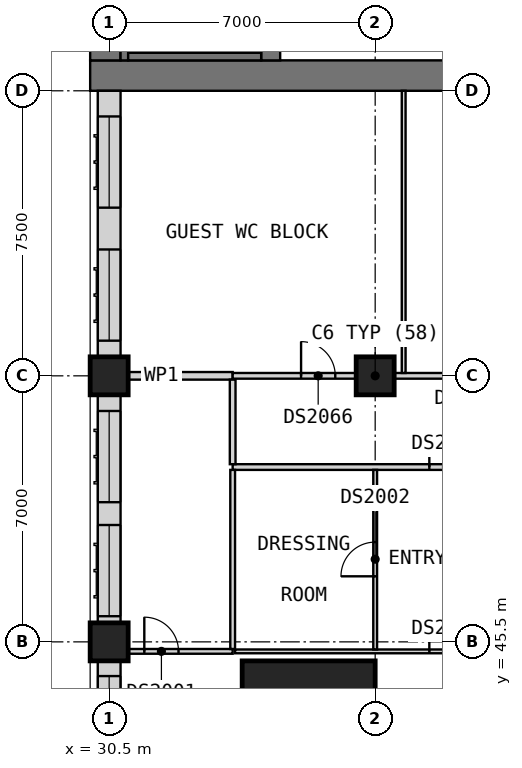
"""IFC4 building model, lengths in metres.
Left out: names, types, materials, properties, quantities, classifications, styles, units other than length and angle.
Written with IfcOpenShell. Run it as: python <this file> out.ifc"""

import sys

from ifc_helpers import new_model, si_unit, direction, frame, frame_2d, origin, origin_2d, place, context, subcontext, project, spatial, rectangle, extrude, element, fill, save


model = new_model("IFC4")
c1 = context("Model", 3, precision=1e-05, world=origin(), true_north=direction((0.0, 1.0)))
c2 = subcontext(c1, "Body", "Model", "MODEL_VIEW")
j1 = project(units=[si_unit("LENGTHUNIT", "METRE"), si_unit("PLANEANGLEUNIT", "RADIAN")], contexts=[c1])
p1 = place(None, origin())
s1 = spatial("IfcSite", under=j1, at=p1, CompositionType="ELEMENT")
p2 = place(p1, origin())
s2 = spatial("IfcBuilding", under=s1, at=p2, CompositionType="ELEMENT")
p3 = place(p2, frame((0.0, 0.0, 162.6)))
s3 = spatial("IfcBuildingStorey", under=s2, at=p3, CompositionType="ELEMENT", Elevation=162.6)
for number, where, z_axis, x_axis in (
    (1, (30.5, 45.5, 0.0), (0.0, 0.0, 1.0), (1.0, 0.0, 0.0)),
    (2, (30.5, 52.5, 0.0), (0.0, 0.0, 1.0), (1.0, 0.0, 0.0)),
    (3, (37.5, 52.5, 0.0), (0.0, 0.0, 1.0), (1.0, 0.0, 0.0)),
):
    element("IfcColumn", number, at=place(p3, frame(where, z_axis=z_axis, x_axis=x_axis)), inside=s3, PredefinedType="COLUMN", context=c2, shape_type="SweptSolid", body=[
        extrude(rectangle(XDim=1.0, YDim=1.0, at=origin_2d()), origin(), (0.0, 0.0, 1.0), 3.6),
    ])
p4 = place(p3, frame((35.75, 43.25, 0.0), z_axis=(0.0, 0.0, 1.0), x_axis=(1.0, 0.0, 0.0)))
e4 = element("IfcColumn", 4, at=p4, inside=s3, PredefinedType="COLUMN", context=c2, shape_type="SweptSolid", body=[
    extrude(rectangle(XDim=3.5, YDim=3.5, at=origin_2d()), origin(), (0.0, 0.0, 1.0), 3.6),
])
p5 = place(p3, frame((30.0, 60.4, 0.0), z_axis=(0.0, 0.0, 1.0), x_axis=(1.0, 0.0, 0.0)))
e5 = element("IfcWall", 5, at=p5, inside=s3, PredefinedType="SHEAR", context=c2, shape_type="SweptSolid", body=[
    extrude(rectangle(XDim=30.0, YDim=0.8, at=frame_2d((15.0, 0.0))), origin(), (0.0, 0.0, 1.0), 3.6),
])
p6 = place(p5, frame((21.9, 0.0, 0.0)))
e6 = element("IfcOpeningElement", 6, at=p6, cuts=e5, PredefinedType="OPENING", context=c2, shape_type="SweptSolid", body=[
    extrude(rectangle(XDim=1.8, YDim=2.1, at=frame_2d((0.9, 1.05))), frame((0.0, 0.41, 0.0), z_axis=(0.0, -1.0, 0.0), x_axis=(1.0, 0.0, 0.0)), (0.0, 0.0, 1.0), 0.82),
])
p7 = place(p5, frame((26.5, 0.0, 0.0)))
e7 = element("IfcOpeningElement", 7, at=p7, cuts=e5, PredefinedType="OPENING", context=c2, shape_type="SweptSolid", body=[
    extrude(rectangle(XDim=1.2, YDim=2.1, at=frame_2d((0.6, 1.05))), frame((0.0, 0.41, 0.0), z_axis=(0.0, -1.0, 0.0), x_axis=(1.0, 0.0, 0.0)), (0.0, 0.0, 1.0), 0.82),
])
p8 = place(p3, frame((30.4, 60.8, 0.0), z_axis=(0.0, 0.0, 1.0), x_axis=(0.0, 1.0, 0.0)))
e8 = element("IfcWall", 8, at=p8, inside=s3, PredefinedType="SHEAR", context=c2, shape_type="SweptSolid", body=[
    extrude(rectangle(XDim=20.9, YDim=0.8, at=frame_2d((10.45, 0.0))), origin(), (0.0, 0.0, 1.0), 3.6),
])
p9 = place(p3, frame((34.75, 60.8, 0.0), z_axis=(0.0, 0.0, 1.0), x_axis=(0.0, 1.0, 0.0)))
e9 = element("IfcWall", 9, at=p9, inside=s3, PredefinedType="SHEAR", context=c2, shape_type="SweptSolid", body=[
    extrude(rectangle(XDim=3.4, YDim=0.5, at=frame_2d((1.7, 0.0))), origin(), (0.0, 0.0, 1.0), 3.6),
])
p10 = place(p3, frame((30.5, 60.0, 0.0), z_axis=(0.0, 0.0, 1.0), x_axis=(0.0, -1.0, 0.0)))
e10 = element("IfcWall", 10, at=p10, inside=s3, PredefinedType="SOLIDWALL", context=c2, shape_type="SweptSolid", body=[
    extrude(rectangle(XDim=7.0, YDim=0.6, at=frame_2d((3.5, 0.0))), origin(), (0.0, 0.0, 1.0), 3.2),
])
p11 = place(p10, frame((4.175, 0.0, 0.8)))
e11 = element("IfcOpeningElement", 11, at=p11, cuts=e10, PredefinedType="OPENING", context=c2, shape_type="SweptSolid", body=[
    extrude(rectangle(XDim=2.4, YDim=1.8, at=frame_2d((1.2, 0.9))), frame((0.0, 0.31, 0.0), z_axis=(0.0, -1.0, 0.0), x_axis=(1.0, 0.0, 0.0)), (0.0, 0.0, 1.0), 0.62),
])
p12 = place(p10, frame((0.675, 0.0, 0.8)))
e12 = element("IfcOpeningElement", 12, at=p12, cuts=e10, PredefinedType="OPENING", context=c2, shape_type="SweptSolid", body=[
    extrude(rectangle(XDim=2.4, YDim=1.8, at=frame_2d((1.2, 0.9))), frame((0.0, 0.31, 0.0), z_axis=(0.0, -1.0, 0.0), x_axis=(1.0, 0.0, 0.0)), (0.0, 0.0, 1.0), 0.62),
])
p13 = place(p3, frame((30.5, 52.0, 0.0), z_axis=(0.0, 0.0, 1.0), x_axis=(0.0, -1.0, 0.0)))
e13 = element("IfcWall", 13, at=p13, inside=s3, PredefinedType="SOLIDWALL", context=c2, shape_type="SweptSolid", body=[
    extrude(rectangle(XDim=6.0, YDim=0.6, at=frame_2d((3.0, 0.0))), origin(), (0.0, 0.0, 1.0), 2.85),
])
p14 = place(p13, frame((3.425, 0.0, 0.8)))
e14 = element("IfcOpeningElement", 14, at=p14, cuts=e13, PredefinedType="OPENING", context=c2, shape_type="SweptSolid", body=[
    extrude(rectangle(XDim=2.4, YDim=1.8, at=frame_2d((1.2, 0.9))), frame((0.0, 0.31, 0.0), z_axis=(0.0, -1.0, 0.0), x_axis=(1.0, 0.0, 0.0)), (0.0, 0.0, 1.0), 0.62),
])
p15 = place(p13, frame((0.425, 0.0, 0.8)))
e15 = element("IfcOpeningElement", 15, at=p15, cuts=e13, PredefinedType="OPENING", context=c2, shape_type="SweptSolid", body=[
    extrude(rectangle(XDim=2.4, YDim=1.8, at=frame_2d((1.2, 0.9))), frame((0.0, 0.31, 0.0), z_axis=(0.0, -1.0, 0.0), x_axis=(1.0, 0.0, 0.0)), (0.0, 0.0, 1.0), 0.62),
])
p16 = place(p3, frame((30.5, 45.0, 0.0), z_axis=(0.0, 0.0, 1.0), x_axis=(0.0, -1.0, 0.0)))
e16 = element("IfcWall", 16, at=p16, inside=s3, PredefinedType="SOLIDWALL", context=c2, shape_type="SweptSolid", body=[
    extrude(rectangle(XDim=3.5, YDim=0.6, at=frame_2d((1.75, 0.0))), origin(), (0.0, 0.0, 1.0), 3.2),
])
p17 = place(p16, frame((0.4, 0.0, 0.8)))
e17 = element("IfcOpeningElement", 17, at=p17, cuts=e16, PredefinedType="OPENING", context=c2, shape_type="SweptSolid", body=[
    extrude(rectangle(XDim=1.8, YDim=1.8, at=frame_2d((0.9, 0.9))), frame((0.0, 0.31, 0.0), z_axis=(0.0, -1.0, 0.0), x_axis=(1.0, 0.0, 0.0)), (0.0, 0.0, 1.0), 0.62),
])
p18 = place(p3, frame((30.9, 60.8, 0.0), z_axis=(0.0, 0.0, 1.0), x_axis=(0.0, 1.0, 0.0)))
e18 = element("IfcWall", 18, at=p18, inside=s3, PredefinedType="SOLIDWALL", context=c2, shape_type="SweptSolid", body=[
    extrude(rectangle(XDim=20.9, YDim=0.2, at=frame_2d((10.45, 0.0))), origin(), (0.0, 0.0, 1.0), 3.19),
])
p19 = place(p3, frame((31.0, 60.9, 0.0), z_axis=(0.0, 0.0, 1.0), x_axis=(1.0, 0.0, 0.0)))
e19 = element("IfcWall", 19, at=p19, inside=s3, PredefinedType="SOLIDWALL", context=c2, shape_type="SweptSolid", body=[
    extrude(rectangle(XDim=3.5, YDim=0.2, at=frame_2d((1.75, 0.0))), origin(), (0.0, 0.0, 1.0), 3.19),
])
p20 = place(p3, frame((30.0, 52.5, 0.0), z_axis=(0.0, 0.0, 1.0), x_axis=(1.0, 0.0, 0.0)))
e20 = element("IfcWall", 20, at=p20, inside=s3, PredefinedType="PARTITIONING", context=c2, shape_type="SweptSolid", body=[
    extrude(rectangle(XDim=3.75, YDim=0.2, at=frame_2d((1.875, 0.0))), origin(), (0.0, 0.0, 1.0), 3.2),
])
p21 = place(p3, frame((33.75, 50.1, 0.0), z_axis=(0.0, 0.0, 1.0), x_axis=(1.0, 0.0, 0.0)))
e21 = element("IfcWall", 21, at=p21, inside=s3, PredefinedType="PARTITIONING", context=c2, shape_type="SweptSolid", body=[
    extrude(rectangle(XDim=39.9, YDim=0.15, at=frame_2d((19.95, 0.0))), origin(), (0.0, 0.0, 1.0), 3.2),
])
p22 = place(p21, frame((5.175, 0.0, 0.0)))
e22 = element("IfcOpeningElement", 22, at=p22, cuts=e21, PredefinedType="OPENING", context=c2, shape_type="SweptSolid", body=[
    extrude(rectangle(XDim=0.9, YDim=2.1, at=frame_2d((0.45, 1.05))), frame((0.0, 0.085, 0.0), z_axis=(0.0, -1.0, 0.0), x_axis=(1.0, 0.0, 0.0)), (0.0, 0.0, 1.0), 0.17),
])
p23 = place(p21, frame((13.05, 0.0, 0.0)))
e23 = element("IfcOpeningElement", 23, at=p23, cuts=e21, PredefinedType="OPENING", context=c2, shape_type="SweptSolid", body=[
    extrude(rectangle(XDim=0.9, YDim=2.1, at=frame_2d((0.45, 1.05))), frame((0.0, 0.085, 0.0), z_axis=(0.0, -1.0, 0.0), x_axis=(1.0, 0.0, 0.0)), (0.0, 0.0, 1.0), 0.17),
])
p24 = place(p21, frame((20.55, 0.0, 0.0)))
e24 = element("IfcOpeningElement", 24, at=p24, cuts=e21, PredefinedType="OPENING", context=c2, shape_type="SweptSolid", body=[
    extrude(rectangle(XDim=0.9, YDim=2.1, at=frame_2d((0.45, 1.05))), frame((0.0, 0.085, 0.0), z_axis=(0.0, -1.0, 0.0), x_axis=(1.0, 0.0, 0.0)), (0.0, 0.0, 1.0), 0.17),
])
p25 = place(p21, frame((24.3, 0.0, 0.0)))
e25 = element("IfcOpeningElement", 25, at=p25, cuts=e21, PredefinedType="OPENING", context=c2, shape_type="SweptSolid", body=[
    extrude(rectangle(XDim=0.9, YDim=2.1, at=frame_2d((0.45, 1.05))), frame((0.0, 0.085, 0.0), z_axis=(0.0, -1.0, 0.0), x_axis=(1.0, 0.0, 0.0)), (0.0, 0.0, 1.0), 0.17),
])
p26 = place(p21, frame((36.113, 0.0, 0.0)))
e26 = element("IfcOpeningElement", 26, at=p26, cuts=e21, PredefinedType="OPENING", context=c2, shape_type="SweptSolid", body=[
    extrude(rectangle(XDim=0.9, YDim=2.1, at=frame_2d((0.45, 1.05))), frame((0.0, 0.085, 0.0), z_axis=(0.0, -1.0, 0.0), x_axis=(1.0, 0.0, 0.0)), (0.0, 0.0, 1.0), 0.17),
])
p27 = place(p21, frame((38.25, 0.0, 0.0)))
e27 = element("IfcOpeningElement", 27, at=p27, cuts=e21, PredefinedType="OPENING", context=c2, shape_type="SweptSolid", body=[
    extrude(rectangle(XDim=0.9, YDim=2.1, at=frame_2d((0.45, 1.05))), frame((0.0, 0.085, 0.0), z_axis=(0.0, -1.0, 0.0), x_axis=(1.0, 0.0, 0.0)), (0.0, 0.0, 1.0), 0.17),
])
p28 = place(p3, frame((33.75, 52.5, 0.0), z_axis=(0.0, 0.0, 1.0), x_axis=(1.0, 0.0, 0.0)))
e28 = element("IfcWall", 28, at=p28, inside=s3, PredefinedType="PARTITIONING", context=c2, shape_type="SweptSolid", body=[
    extrude(rectangle(XDim=17.15, YDim=0.15, at=frame_2d((8.575, 0.0))), origin(), (0.0, 0.0, 1.0), 3.2),
])
p29 = place(p28, frame((1.8, 0.0, 0.0)))
e29 = element("IfcOpeningElement", 29, at=p29, cuts=e28, PredefinedType="OPENING", context=c2, shape_type="SweptSolid", body=[
    extrude(rectangle(XDim=0.9, YDim=2.1, at=frame_2d((0.45, 1.05))), frame((0.0, 0.085, 0.0), z_axis=(0.0, -1.0, 0.0), x_axis=(1.0, 0.0, 0.0)), (0.0, 0.0, 1.0), 0.17),
])
p30 = place(p28, frame((5.775, 0.0, 0.0)))
e30 = element("IfcOpeningElement", 30, at=p30, cuts=e28, PredefinedType="OPENING", context=c2, shape_type="SweptSolid", body=[
    extrude(rectangle(XDim=0.9, YDim=2.1, at=frame_2d((0.45, 1.05))), frame((0.0, 0.085, 0.0), z_axis=(0.0, -1.0, 0.0), x_axis=(1.0, 0.0, 0.0)), (0.0, 0.0, 1.0), 0.17),
])
p31 = place(p28, frame((12.1, 0.0, 0.0)))
e31 = element("IfcOpeningElement", 31, at=p31, cuts=e28, PredefinedType="OPENING", context=c2, shape_type="SweptSolid", body=[
    extrude(rectangle(XDim=0.9, YDim=2.1, at=frame_2d((0.45, 1.05))), frame((0.0, 0.085, 0.0), z_axis=(0.0, -1.0, 0.0), x_axis=(1.0, 0.0, 0.0)), (0.0, 0.0, 1.0), 0.17),
])
p32 = place(p3, frame((33.75, 50.175, 0.0), z_axis=(0.0, 0.0, 1.0), x_axis=(0.0, 1.0, 0.0)))
e32 = element("IfcWall", 32, at=p32, inside=s3, PredefinedType="PARTITIONING", context=c2, shape_type="SweptSolid", body=[
    extrude(rectangle(XDim=2.225, YDim=0.15, at=frame_2d((1.112, 0.0))), origin(), (0.0, 0.0, 1.0), 3.2),
])
p33 = place(p3, frame((33.812, 45.25, 0.0), z_axis=(0.0, 0.0, 1.0), x_axis=(1.0, 0.0, 0.0)))
e33 = element("IfcWall", 33, at=p33, inside=s3, PredefinedType="PARTITIONING", context=c2, shape_type="SweptSolid", body=[
    extrude(rectangle(XDim=7.337, YDim=0.1, at=frame_2d((3.669, 0.0))), origin(), (0.0, 0.0, 1.0), 3.2),
])
p34 = place(p33, frame((5.113, 0.0, 0.0)))
e34 = element("IfcOpeningElement", 34, at=p34, cuts=e33, PredefinedType="OPENING", context=c2, shape_type="SweptSolid", body=[
    extrude(rectangle(XDim=0.9, YDim=2.1, at=frame_2d((0.45, 1.05))), frame((0.0, 0.06, 0.0), z_axis=(0.0, -1.0, 0.0), x_axis=(1.0, 0.0, 0.0)), (0.0, 0.0, 1.0), 0.12),
])
p35 = place(p3, frame((37.5, 45.3, 0.0), z_axis=(0.0, 0.0, 1.0), x_axis=(0.0, 1.0, 0.0)))
e35 = element("IfcWall", 35, at=p35, inside=s3, PredefinedType="PARTITIONING", context=c2, shape_type="SweptSolid", body=[
    extrude(rectangle(XDim=4.725, YDim=0.1, at=frame_2d((2.362, 0.0))), origin(), (0.0, 0.0, 1.0), 3.2),
])
p36 = place(p35, frame((1.925, 0.0, 0.0)))
e36 = element("IfcOpeningElement", 36, at=p36, cuts=e35, PredefinedType="OPENING", context=c2, shape_type="SweptSolid", body=[
    extrude(rectangle(XDim=0.9, YDim=2.1, at=frame_2d((0.45, 1.05))), frame((0.0, 0.06, 0.0), z_axis=(0.0, -1.0, 0.0), x_axis=(1.0, 0.0, 0.0)), (0.0, 0.0, 1.0), 0.12),
])
p37 = place(p3, frame((38.25, 52.575, 0.0), z_axis=(0.0, 0.0, 1.0), x_axis=(0.0, 1.0, 0.0)))
e37 = element("IfcWall", 37, at=p37, inside=s3, PredefinedType="PARTITIONING", context=c2, shape_type="SweptSolid", body=[
    extrude(rectangle(XDim=7.425, YDim=0.1, at=frame_2d((3.712, 0.0))), origin(), (0.0, 0.0, 1.0), 3.2),
])
p38 = place(p3, frame((30.0, 45.25, 0.0), z_axis=(0.0, 0.0, 1.0), x_axis=(1.0, 0.0, 0.0)))
e38 = element("IfcWall", 38, at=p38, inside=s3, PredefinedType="PARTITIONING", context=c2, shape_type="SweptSolid", body=[
    extrude(rectangle(XDim=3.75, YDim=0.125, at=frame_2d((1.875, 0.0))), origin(), (0.0, 0.0, 1.0), 2.85),
])
p39 = place(p38, frame((1.425, 0.0, 0.0)))
e39 = element("IfcOpeningElement", 39, at=p39, cuts=e38, PredefinedType="OPENING", context=c2, shape_type="SweptSolid", body=[
    extrude(rectangle(XDim=0.9, YDim=2.1, at=frame_2d((0.45, 1.05))), frame((0.0, 0.073, 0.0), z_axis=(0.0, -1.0, 0.0), x_axis=(1.0, 0.0, 0.0)), (0.0, 0.0, 1.0), 0.145),
])
p40 = place(p3, frame((33.75, 45.312, 0.0), z_axis=(0.0, 0.0, 1.0), x_axis=(0.0, 1.0, 0.0)))
e40 = element("IfcWall", 40, at=p40, inside=s3, PredefinedType="PARTITIONING", context=c2, shape_type="SweptSolid", body=[
    extrude(rectangle(XDim=4.712, YDim=0.125, at=frame_2d((2.356, 0.0))), origin(), (0.0, 0.0, 1.0), 3.2),
])
p41 = place(p11, origin())
e41 = element("IfcWindow", 41, at=p41, inside=s3, PartitioningType="SINGLE_PANEL", PredefinedType="WINDOW", context=c2, shape_type="SweptSolid", body=[
    extrude(rectangle(XDim=2.4, YDim=1.8, at=frame_2d((1.2, 0.9))), frame((0.0, -0.07, 0.0), z_axis=(0.0, -1.0, 0.0), x_axis=(1.0, 0.0, 0.0)), (0.0, 0.0, 1.0), 0.06),
])
fill(e11, e41)
p42 = place(p12, origin())
e42 = element("IfcWindow", 42, at=p42, inside=s3, PartitioningType="SINGLE_PANEL", PredefinedType="WINDOW", context=c2, shape_type="SweptSolid", body=[
    extrude(rectangle(XDim=2.4, YDim=1.8, at=frame_2d((1.2, 0.9))), frame((0.0, -0.07, 0.0), z_axis=(0.0, -1.0, 0.0), x_axis=(1.0, 0.0, 0.0)), (0.0, 0.0, 1.0), 0.06),
])
fill(e12, e42)
p43 = place(p14, origin())
e43 = element("IfcWindow", 43, at=p43, inside=s3, PartitioningType="SINGLE_PANEL", PredefinedType="WINDOW", context=c2, shape_type="SweptSolid", body=[
    extrude(rectangle(XDim=2.4, YDim=1.8, at=frame_2d((1.2, 0.9))), frame((0.0, -0.07, 0.0), z_axis=(0.0, -1.0, 0.0), x_axis=(1.0, 0.0, 0.0)), (0.0, 0.0, 1.0), 0.06),
])
fill(e14, e43)
p44 = place(p15, origin())
e44 = element("IfcWindow", 44, at=p44, inside=s3, PartitioningType="SINGLE_PANEL", PredefinedType="WINDOW", context=c2, shape_type="SweptSolid", body=[
    extrude(rectangle(XDim=2.4, YDim=1.8, at=frame_2d((1.2, 0.9))), frame((0.0, -0.07, 0.0), z_axis=(0.0, -1.0, 0.0), x_axis=(1.0, 0.0, 0.0)), (0.0, 0.0, 1.0), 0.06),
])
fill(e15, e44)
p45 = place(p17, origin())
e45 = element("IfcWindow", 45, at=p45, inside=s3, PartitioningType="SINGLE_PANEL", PredefinedType="WINDOW", context=c2, shape_type="SweptSolid", body=[
    extrude(rectangle(XDim=1.8, YDim=1.8, at=frame_2d((0.9, 0.9))), frame((0.0, -0.07, 0.0), z_axis=(0.0, -1.0, 0.0), x_axis=(1.0, 0.0, 0.0)), (0.0, 0.0, 1.0), 0.06),
])
fill(e17, e45)
p46 = place(p39, origin())
e46 = element("IfcDoor", 46, at=p46, inside=s3, OperationType="SINGLE_SWING_LEFT", PredefinedType="DOOR", context=c2, shape_type="SweptSolid", body=[
    extrude(rectangle(XDim=0.9, YDim=2.1, at=frame_2d((0.45, 1.05))), frame((0.0, 0.025, 0.0), z_axis=(0.0, -1.0, 0.0), x_axis=(1.0, 0.0, 0.0)), (0.0, 0.0, 1.0), 0.05),
])
fill(e39, e46)
p47 = place(p36, origin())
e47 = element("IfcDoor", 47, at=p47, inside=s3, OperationType="SINGLE_SWING_RIGHT", PredefinedType="DOOR", context=c2, shape_type="SweptSolid", body=[
    extrude(rectangle(XDim=0.9, YDim=2.1, at=frame_2d((0.45, 1.05))), frame((0.0, 0.025, 0.0), z_axis=(0.0, -1.0, 0.0), x_axis=(1.0, 0.0, 0.0)), (0.0, 0.0, 1.0), 0.05),
])
fill(e36, e47)
p48 = place(p22, origin())
e48 = element("IfcDoor", 48, at=p48, inside=s3, OperationType="SINGLE_SWING_RIGHT", PredefinedType="DOOR", context=c2, shape_type="SweptSolid", body=[
    extrude(rectangle(XDim=0.9, YDim=2.1, at=frame_2d((0.45, 1.05))), frame((0.0, 0.025, 0.0), z_axis=(0.0, -1.0, 0.0), x_axis=(1.0, 0.0, 0.0)), (0.0, 0.0, 1.0), 0.05),
])
fill(e22, e48)
p49 = place(p34, origin())
e49 = element("IfcDoor", 49, at=p49, inside=s3, OperationType="SINGLE_SWING_LEFT", PredefinedType="DOOR", context=c2, shape_type="SweptSolid", body=[
    extrude(rectangle(XDim=0.9, YDim=2.1, at=frame_2d((0.45, 1.05))), frame((0.0, 0.025, 0.0), z_axis=(0.0, -1.0, 0.0), x_axis=(1.0, 0.0, 0.0)), (0.0, 0.0, 1.0), 0.05),
])
fill(e34, e49)
p50 = place(p29, origin())
e50 = element("IfcDoor", 50, at=p50, inside=s3, OperationType="SINGLE_SWING_LEFT", PredefinedType="DOOR", context=c2, shape_type="SweptSolid", body=[
    extrude(rectangle(XDim=0.9, YDim=2.1, at=frame_2d((0.45, 1.05))), frame((0.0, 0.025, 0.0), z_axis=(0.0, -1.0, 0.0), x_axis=(1.0, 0.0, 0.0)), (0.0, 0.0, 1.0), 0.05),
])
fill(e29, e50)
save(model, sys.argv[1])
